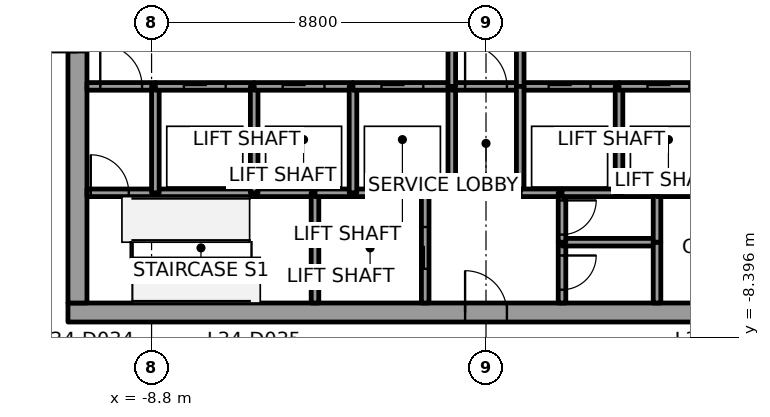
"""IFC4 building model, lengths in metres.
Left out: names, types, materials, properties, quantities, classifications, styles, units other than length and angle.
Written with IfcOpenShell. Run it as: python <this file> out.ifc"""

import sys

from ifc_helpers import new_model, si_unit, direction, frame, frame_2d, origin, place, context, subcontext, project, spatial, rectangle, extrude, element, fill, save


model = new_model("IFC4")
c1 = context("Model", 3, precision=1e-05, world=origin(), true_north=direction((0.0, 1.0)))
c2 = subcontext(c1, "Body", "Model", "MODEL_VIEW")
j1 = project(units=[si_unit("LENGTHUNIT", "METRE"), si_unit("PLANEANGLEUNIT", "RADIAN")], contexts=[c1])
p1 = place(None, origin())
s1 = spatial("IfcSite", under=j1, at=p1, CompositionType="ELEMENT")
p2 = place(p1, origin())
s2 = spatial("IfcBuilding", under=s1, at=p2, CompositionType="ELEMENT")
p3 = place(p2, frame((0.0, 0.0, 157.8)))
s3 = spatial("IfcBuildingStorey", under=s2, at=p3, CompositionType="ELEMENT", Elevation=157.8)
p4 = place(p3, frame((-11.0, -7.75, 0.0), z_axis=(0.0, 0.0, 1.0), x_axis=(1.0, 0.0, 0.0)))
e1 = element("IfcWall", 1, at=p4, inside=s3, PredefinedType="SHEAR", context=c2, shape_type="SweptSolid", body=[
    extrude(rectangle(XDim=22.0, YDim=0.5, at=frame_2d((11.0, 0.0))), origin(), (0.0, 0.0, 1.0), 4.0),
])
p5 = place(p4, frame((10.45, 0.0, 0.0)))
e2 = element("IfcOpeningElement", 2, at=p5, cuts=e1, PredefinedType="OPENING", context=c2, shape_type="SweptSolid", body=[
    extrude(rectangle(XDim=1.1, YDim=2.1, at=frame_2d((0.55, 1.05))), frame((0.0, 0.25, 0.0), z_axis=(0.0, -1.0, 0.0), x_axis=(1.0, 0.0, 0.0)), (0.0, 0.0, 1.0), 0.5),
])
p6 = place(p3, frame((-10.75, -7.5, 0.0), z_axis=(0.0, 0.0, 1.0), x_axis=(0.0, 1.0, 0.0)))
e3 = element("IfcWall", 3, at=p6, inside=s3, PredefinedType="SHEAR", context=c2, shape_type="SweptSolid", body=[
    extrude(rectangle(XDim=15.0, YDim=0.5, at=frame_2d((7.5, 0.0))), origin(), (0.0, 0.0, 1.0), 4.0),
])
p7 = place(p6, frame((6.6, 0.0, 0.0)))
e4 = element("IfcOpeningElement", 4, at=p7, cuts=e3, PredefinedType="OPENING", context=c2, shape_type="SweptSolid", body=[
    extrude(rectangle(XDim=1.8, YDim=2.1, at=frame_2d((0.9, 1.05))), frame((0.0, 0.25, 0.0), z_axis=(0.0, -1.0, 0.0), x_axis=(1.0, 0.0, 0.0)), (0.0, 0.0, 1.0), 0.5),
])
p8 = place(p3, frame((-10.5, -4.6, 0.0), z_axis=(0.0, 0.0, 1.0), x_axis=(1.0, 0.0, 0.0)))
e5 = element("IfcWall", 5, at=p8, inside=s3, PredefinedType="SOLIDWALL", context=c2, shape_type="SweptSolid", body=[
    extrude(rectangle(XDim=1.8, YDim=0.2, at=frame_2d((0.9, 0.0))), origin(), (0.0, 0.0, 1.0), 3.85),
])
p9 = place(p8, frame((0.1, 0.0, 0.0)))
e6 = element("IfcOpeningElement", 6, at=p9, cuts=e5, PredefinedType="OPENING", context=c2, shape_type="SweptSolid", body=[
    extrude(rectangle(XDim=1.0, YDim=2.1, at=frame_2d((0.5, 1.05))), frame((0.0, 0.1, 0.0), z_axis=(0.0, -1.0, 0.0), x_axis=(1.0, 0.0, 0.0)), (0.0, 0.0, 1.0), 0.2),
])
p10 = place(p3, frame((-10.5, -1.8, 0.0), z_axis=(0.0, 0.0, 1.0), x_axis=(1.0, 0.0, 0.0)))
e7 = element("IfcWall", 7, at=p10, inside=s3, PredefinedType="SOLIDWALL", context=c2, shape_type="SweptSolid", body=[
    extrude(rectangle(XDim=1.8, YDim=0.2, at=frame_2d((0.9, 0.0))), origin(), (0.0, 0.0, 1.0), 3.85),
])
p11 = place(p10, frame((0.35, 0.0, 0.0)))
e8 = element("IfcOpeningElement", 8, at=p11, cuts=e7, PredefinedType="OPENING", context=c2, shape_type="SweptSolid", body=[
    extrude(rectangle(XDim=1.1, YDim=2.1, at=frame_2d((0.55, 1.05))), frame((0.0, 0.1, 0.0), z_axis=(0.0, -1.0, 0.0), x_axis=(1.0, 0.0, 0.0)), (0.0, 0.0, 1.0), 0.2),
])
p12 = place(p3, frame((-8.7, -4.6, 0.0), z_axis=(0.0, 0.0, 1.0), x_axis=(1.0, 0.0, 0.0)))
e9 = element("IfcWall", 9, at=p12, inside=s3, PredefinedType="SOLIDWALL", context=c2, shape_type="SweptSolid", body=[
    extrude(rectangle(XDim=2.6, YDim=0.2, at=frame_2d((1.3, 0.0))), origin(), (0.0, 0.0, 1.0), 3.85),
])
p13 = place(p3, frame((-8.7, -4.6, 0.0), z_axis=(0.0, 0.0, 1.0), x_axis=(0.0, 1.0, 0.0)))
e10 = element("IfcWall", 10, at=p13, inside=s3, PredefinedType="SOLIDWALL", context=c2, shape_type="SweptSolid", body=[
    extrude(rectangle(XDim=2.8, YDim=0.2, at=frame_2d((1.4, 0.0))), origin(), (0.0, 0.0, 1.0), 3.85),
])
p14 = place(p3, frame((-8.7, -1.8, 0.0), z_axis=(0.0, 0.0, 1.0), x_axis=(1.0, 0.0, 0.0)))
e11 = element("IfcWall", 11, at=p14, inside=s3, PredefinedType="SOLIDWALL", context=c2, shape_type="SweptSolid", body=[
    extrude(rectangle(XDim=2.6, YDim=0.2, at=frame_2d((1.3, 0.0))), origin(), (0.0, 0.0, 1.0), 3.85),
])
p15 = place(p14, frame((0.75, 0.0, 0.0)))
e12 = element("IfcOpeningElement", 12, at=p15, cuts=e11, PredefinedType="OPENING", context=c2, shape_type="SweptSolid", body=[
    extrude(rectangle(XDim=1.1, YDim=2.1, at=frame_2d((0.55, 1.05))), frame((0.0, 0.1, 0.0), z_axis=(0.0, -1.0, 0.0), x_axis=(1.0, 0.0, 0.0)), (0.0, 0.0, 1.0), 0.2),
])
p16 = place(p3, frame((-6.1, -4.6, 0.0), z_axis=(0.0, 0.0, 1.0), x_axis=(1.0, 0.0, 0.0)))
e13 = element("IfcWall", 13, at=p16, inside=s3, PredefinedType="SOLIDWALL", context=c2, shape_type="SweptSolid", body=[
    extrude(rectangle(XDim=1.6, YDim=0.2, at=frame_2d((0.8, 0.0))), origin(), (0.0, 0.0, 1.0), 3.85),
])
p17 = place(p3, frame((-6.1, -4.6, 0.0), z_axis=(0.0, 0.0, 1.0), x_axis=(0.0, 1.0, 0.0)))
e14 = element("IfcWall", 14, at=p17, inside=s3, PredefinedType="SOLIDWALL", context=c2, shape_type="SweptSolid", body=[
    extrude(rectangle(XDim=2.8, YDim=0.2, at=frame_2d((1.4, 0.0))), origin(), (0.0, 0.0, 1.0), 3.85),
])
p18 = place(p3, frame((-6.1, -1.8, 0.0), z_axis=(0.0, 0.0, 1.0), x_axis=(1.0, 0.0, 0.0)))
e15 = element("IfcWall", 15, at=p18, inside=s3, PredefinedType="SOLIDWALL", context=c2, shape_type="SweptSolid", body=[
    extrude(rectangle(XDim=2.6, YDim=0.2, at=frame_2d((1.3, 0.0))), origin(), (0.0, 0.0, 1.0), 3.85),
])
p19 = place(p18, frame((0.75, 0.0, 0.0)))
e16 = element("IfcOpeningElement", 16, at=p19, cuts=e15, PredefinedType="OPENING", context=c2, shape_type="SweptSolid", body=[
    extrude(rectangle(XDim=1.1, YDim=2.1, at=frame_2d((0.55, 1.05))), frame((0.0, 0.1, 0.0), z_axis=(0.0, -1.0, 0.0), x_axis=(1.0, 0.0, 0.0)), (0.0, 0.0, 1.0), 0.2),
])
p20 = place(p3, frame((-4.5, -4.6, 0.0), z_axis=(0.0, 0.0, 1.0), x_axis=(0.0, -1.0, 0.0)))
e17 = element("IfcWall", 17, at=p20, inside=s3, PredefinedType="SOLIDWALL", context=c2, shape_type="SweptSolid", body=[
    extrude(rectangle(XDim=2.9, YDim=0.2, at=frame_2d((1.45, 0.0))), origin(), (0.0, 0.0, 1.0), 3.85),
])
p21 = place(p3, frame((-4.5, -4.6, 0.0), z_axis=(0.0, 0.0, 1.0), x_axis=(1.0, 0.0, 0.0)))
e18 = element("IfcWall", 18, at=p21, inside=s3, PredefinedType="SOLIDWALL", context=c2, shape_type="SweptSolid", body=[
    extrude(rectangle(XDim=1.0, YDim=0.2, at=frame_2d((0.5, 0.0))), origin(), (0.0, 0.0, 1.0), 3.85),
])
p22 = place(p3, frame((-3.5, -4.6, 0.0), z_axis=(0.0, 0.0, 1.0), x_axis=(1.0, 0.0, 0.0)))
e19 = element("IfcWall", 19, at=p22, inside=s3, PredefinedType="SOLIDWALL", context=c2, shape_type="SweptSolid", body=[
    extrude(rectangle(XDim=1.9, YDim=0.2, at=frame_2d((0.95, 0.0))), origin(), (0.0, 0.0, 1.0), 3.85),
])
p23 = place(p3, frame((-3.5, -4.6, 0.0), z_axis=(0.0, 0.0, 1.0), x_axis=(0.0, 1.0, 0.0)))
e20 = element("IfcWall", 20, at=p23, inside=s3, PredefinedType="SOLIDWALL", context=c2, shape_type="SweptSolid", body=[
    extrude(rectangle(XDim=2.8, YDim=0.2, at=frame_2d((1.4, 0.0))), origin(), (0.0, 0.0, 1.0), 3.85),
])
p24 = place(p3, frame((-3.5, -1.8, 0.0), z_axis=(0.0, 0.0, 1.0), x_axis=(1.0, 0.0, 0.0)))
e21 = element("IfcWall", 21, at=p24, inside=s3, PredefinedType="SOLIDWALL", context=c2, shape_type="SweptSolid", body=[
    extrude(rectangle(XDim=2.6, YDim=0.2, at=frame_2d((1.3, 0.0))), origin(), (0.0, 0.0, 1.0), 3.85),
])
p25 = place(p24, frame((0.75, 0.0, 0.0)))
e22 = element("IfcOpeningElement", 22, at=p25, cuts=e21, PredefinedType="OPENING", context=c2, shape_type="SweptSolid", body=[
    extrude(rectangle(XDim=1.1, YDim=2.1, at=frame_2d((0.55, 1.05))), frame((0.0, 0.1, 0.0), z_axis=(0.0, -1.0, 0.0), x_axis=(1.0, 0.0, 0.0)), (0.0, 0.0, 1.0), 0.2),
])
p26 = place(p3, frame((-1.6, -7.5, 0.0), z_axis=(0.0, 0.0, 1.0), x_axis=(0.0, 1.0, 0.0)))
e23 = element("IfcWall", 23, at=p26, inside=s3, PredefinedType="SOLIDWALL", context=c2, shape_type="SweptSolid", body=[
    extrude(rectangle(XDim=2.9, YDim=0.2, at=frame_2d((1.45, 0.0))), origin(), (0.0, 0.0, 1.0), 3.85),
])
p27 = place(p26, frame((0.9, 0.0, 0.0)))
e24 = element("IfcOpeningElement", 24, at=p27, cuts=e23, PredefinedType="OPENING", context=c2, shape_type="SweptSolid", body=[
    extrude(rectangle(XDim=1.1, YDim=2.1, at=frame_2d((0.55, 1.05))), frame((0.0, 0.1, 0.0), z_axis=(0.0, -1.0, 0.0), x_axis=(1.0, 0.0, 0.0)), (0.0, 0.0, 1.0), 0.2),
])
p28 = place(p3, frame((-1.6, -4.6, 0.0), z_axis=(0.0, 0.0, 1.0), x_axis=(1.0, 0.0, 0.0)))
e25 = element("IfcWall", 25, at=p28, inside=s3, PredefinedType="SOLIDWALL", context=c2, shape_type="SweptSolid", body=[
    extrude(rectangle(XDim=0.7, YDim=0.2, at=frame_2d((0.35, 0.0))), origin(), (0.0, 0.0, 1.0), 3.85),
])
p29 = place(p3, frame((-0.9, -4.6, 0.0), z_axis=(0.0, 0.0, 1.0), x_axis=(0.0, 1.0, 0.0)))
e26 = element("IfcWall", 26, at=p29, inside=s3, PredefinedType="SOLIDWALL", context=c2, shape_type="SweptSolid", body=[
    extrude(rectangle(XDim=2.8, YDim=0.2, at=frame_2d((1.4, 0.0))), origin(), (0.0, 0.0, 1.0), 3.85),
])
p30 = place(p3, frame((-0.9, -1.8, 0.0), z_axis=(0.0, 0.0, 1.0), x_axis=(1.0, 0.0, 0.0)))
e27 = element("IfcWall", 27, at=p30, inside=s3, PredefinedType="SOLIDWALL", context=c2, shape_type="SweptSolid", body=[
    extrude(rectangle(XDim=1.8, YDim=0.2, at=frame_2d((0.9, 0.0))), origin(), (0.0, 0.0, 1.0), 3.85),
])
p31 = place(p30, frame((0.35, 0.0, 0.0)))
e28 = element("IfcOpeningElement", 28, at=p31, cuts=e27, PredefinedType="OPENING", context=c2, shape_type="SweptSolid", body=[
    extrude(rectangle(XDim=1.1, YDim=2.1, at=frame_2d((0.55, 1.05))), frame((0.0, 0.1, 0.0), z_axis=(0.0, -1.0, 0.0), x_axis=(1.0, 0.0, 0.0)), (0.0, 0.0, 1.0), 0.2),
])
p32 = place(p3, frame((-0.9, 1.8, 0.0), z_axis=(0.0, 0.0, 1.0), x_axis=(0.0, -1.0, 0.0)))
e29 = element("IfcWall", 29, at=p32, inside=s3, PredefinedType="SOLIDWALL", context=c2, shape_type="SweptSolid", body=[
    extrude(rectangle(XDim=3.6, YDim=0.2, at=frame_2d((1.8, 0.0))), origin(), (0.0, 0.0, 1.0), 3.85),
])
p33 = place(p32, frame((1.05, 0.0, 0.0)))
e30 = element("IfcOpeningElement", 30, at=p33, cuts=e29, PredefinedType="OPENING", context=c2, shape_type="SweptSolid", body=[
    extrude(rectangle(XDim=1.5, YDim=2.1, at=frame_2d((0.75, 1.05))), frame((0.0, 0.1, 0.0), z_axis=(0.0, -1.0, 0.0), x_axis=(1.0, 0.0, 0.0)), (0.0, 0.0, 1.0), 0.2),
])
p34 = place(p3, frame((0.9, -1.8, 0.0), z_axis=(0.0, 0.0, 1.0), x_axis=(1.0, 0.0, 0.0)))
e31 = element("IfcWall", 31, at=p34, inside=s3, PredefinedType="SOLIDWALL", context=c2, shape_type="SweptSolid", body=[
    extrude(rectangle(XDim=2.6, YDim=0.2, at=frame_2d((1.3, 0.0))), origin(), (0.0, 0.0, 1.0), 3.85),
])
p35 = place(p34, frame((0.75, 0.0, 0.0)))
e32 = element("IfcOpeningElement", 32, at=p35, cuts=e31, PredefinedType="OPENING", context=c2, shape_type="SweptSolid", body=[
    extrude(rectangle(XDim=1.1, YDim=2.1, at=frame_2d((0.55, 1.05))), frame((0.0, 0.1, 0.0), z_axis=(0.0, -1.0, 0.0), x_axis=(1.0, 0.0, 0.0)), (0.0, 0.0, 1.0), 0.2),
])
p36 = place(p3, frame((0.9, -1.8, 0.0), z_axis=(0.0, 0.0, 1.0), x_axis=(0.0, 1.0, 0.0)))
e33 = element("IfcWall", 33, at=p36, inside=s3, PredefinedType="SOLIDWALL", context=c2, shape_type="SweptSolid", body=[
    extrude(rectangle(XDim=3.6, YDim=0.2, at=frame_2d((1.8, 0.0))), origin(), (0.0, 0.0, 1.0), 3.85),
])
p37 = place(p36, frame((1.05, 0.0, 0.0)))
e34 = element("IfcOpeningElement", 34, at=p37, cuts=e33, PredefinedType="OPENING", context=c2, shape_type="SweptSolid", body=[
    extrude(rectangle(XDim=1.5, YDim=2.1, at=frame_2d((0.75, 1.05))), frame((0.0, 0.1, 0.0), z_axis=(0.0, -1.0, 0.0), x_axis=(1.0, 0.0, 0.0)), (0.0, 0.0, 1.0), 0.2),
])
p38 = place(p3, frame((0.9, -1.8, 0.0), z_axis=(0.0, 0.0, 1.0), x_axis=(0.0, -1.0, 0.0)))
e35 = element("IfcWall", 35, at=p38, inside=s3, PredefinedType="SOLIDWALL", context=c2, shape_type="SweptSolid", body=[
    extrude(rectangle(XDim=2.8, YDim=0.2, at=frame_2d((1.4, 0.0))), origin(), (0.0, 0.0, 1.0), 3.85),
])
p39 = place(p3, frame((0.9, -4.6, 0.0), z_axis=(0.0, 0.0, 1.0), x_axis=(1.0, 0.0, 0.0)))
e36 = element("IfcWall", 36, at=p39, inside=s3, PredefinedType="SOLIDWALL", context=c2, shape_type="SweptSolid", body=[
    extrude(rectangle(XDim=1.1, YDim=0.2, at=frame_2d((0.55, 0.0))), origin(), (0.0, 0.0, 1.0), 3.85),
])
p40 = place(p3, frame((2.0, -5.9, 0.0), z_axis=(0.0, 0.0, 1.0), x_axis=(0.0, -1.0, 0.0)))
e37 = element("IfcWall", 37, at=p40, inside=s3, PredefinedType="SOLIDWALL", context=c2, shape_type="SweptSolid", body=[
    extrude(rectangle(XDim=1.6, YDim=0.2, at=frame_2d((0.8, 0.0))), origin(), (0.0, 0.0, 1.0), 3.85),
])
p41 = place(p40, frame((0.35, 0.0, 0.0)))
e38 = element("IfcOpeningElement", 38, at=p41, cuts=e37, PredefinedType="OPENING", context=c2, shape_type="SweptSolid", body=[
    extrude(rectangle(XDim=0.9, YDim=2.1, at=frame_2d((0.45, 1.05))), frame((0.0, 0.1, 0.0), z_axis=(0.0, -1.0, 0.0), x_axis=(1.0, 0.0, 0.0)), (0.0, 0.0, 1.0), 0.2),
])
p42 = place(p3, frame((4.5, -5.9, 0.0), z_axis=(0.0, 0.0, 1.0), x_axis=(-1.0, 0.0, 0.0)))
e39 = element("IfcWall", 39, at=p42, inside=s3, PredefinedType="SOLIDWALL", context=c2, shape_type="SweptSolid", body=[
    extrude(rectangle(XDim=2.5, YDim=0.2, at=frame_2d((1.25, 0.0))), origin(), (0.0, 0.0, 1.0), 3.85),
])
p43 = place(p3, frame((2.0, -4.6, 0.0), z_axis=(0.0, 0.0, 1.0), x_axis=(0.0, -1.0, 0.0)))
e40 = element("IfcWall", 40, at=p43, inside=s3, PredefinedType="SOLIDWALL", context=c2, shape_type="SweptSolid", body=[
    extrude(rectangle(XDim=1.3, YDim=0.2, at=frame_2d((0.65, 0.0))), origin(), (0.0, 0.0, 1.0), 3.85),
])
p44 = place(p43, frame((0.2, 0.0, 0.0)))
e41 = element("IfcOpeningElement", 41, at=p44, cuts=e40, PredefinedType="OPENING", context=c2, shape_type="SweptSolid", body=[
    extrude(rectangle(XDim=0.9, YDim=2.1, at=frame_2d((0.45, 1.05))), frame((0.0, 0.1, 0.0), z_axis=(0.0, -1.0, 0.0), x_axis=(1.0, 0.0, 0.0)), (0.0, 0.0, 1.0), 0.2),
])
p45 = place(p3, frame((3.5, -4.6, 0.0), z_axis=(0.0, 0.0, 1.0), x_axis=(-1.0, 0.0, 0.0)))
e42 = element("IfcWall", 42, at=p45, inside=s3, PredefinedType="SOLIDWALL", context=c2, shape_type="SweptSolid", body=[
    extrude(rectangle(XDim=1.5, YDim=0.2, at=frame_2d((0.75, 0.0))), origin(), (0.0, 0.0, 1.0), 3.85),
])
p46 = place(p3, frame((4.5, -4.6, 0.0), z_axis=(0.0, 0.0, 1.0), x_axis=(-1.0, 0.0, 0.0)))
e43 = element("IfcWall", 43, at=p46, inside=s3, PredefinedType="SOLIDWALL", context=c2, shape_type="SweptSolid", body=[
    extrude(rectangle(XDim=1.0, YDim=0.2, at=frame_2d((0.5, 0.0))), origin(), (0.0, 0.0, 1.0), 3.85),
])
p47 = place(p3, frame((3.5, -4.6, 0.0), z_axis=(0.0, 0.0, 1.0), x_axis=(0.0, 1.0, 0.0)))
e44 = element("IfcWall", 44, at=p47, inside=s3, PredefinedType="SOLIDWALL", context=c2, shape_type="SweptSolid", body=[
    extrude(rectangle(XDim=2.8, YDim=0.2, at=frame_2d((1.4, 0.0))), origin(), (0.0, 0.0, 1.0), 3.85),
])
p48 = place(p3, frame((3.5, -1.8, 0.0), z_axis=(0.0, 0.0, 1.0), x_axis=(1.0, 0.0, 0.0)))
e45 = element("IfcWall", 45, at=p48, inside=s3, PredefinedType="SOLIDWALL", context=c2, shape_type="SweptSolid", body=[
    extrude(rectangle(XDim=2.6, YDim=0.2, at=frame_2d((1.3, 0.0))), origin(), (0.0, 0.0, 1.0), 3.85),
])
p49 = place(p48, frame((0.75, 0.0, 0.0)))
e46 = element("IfcOpeningElement", 46, at=p49, cuts=e45, PredefinedType="OPENING", context=c2, shape_type="SweptSolid", body=[
    extrude(rectangle(XDim=1.1, YDim=2.1, at=frame_2d((0.55, 1.05))), frame((0.0, 0.1, 0.0), z_axis=(0.0, -1.0, 0.0), x_axis=(1.0, 0.0, 0.0)), (0.0, 0.0, 1.0), 0.2),
])
p50 = place(p3, frame((4.5, -5.9, 0.0), z_axis=(0.0, 0.0, 1.0), x_axis=(0.0, -1.0, 0.0)))
e47 = element("IfcWall", 47, at=p50, inside=s3, PredefinedType="SOLIDWALL", context=c2, shape_type="SweptSolid", body=[
    extrude(rectangle(XDim=1.6, YDim=0.2, at=frame_2d((0.8, 0.0))), origin(), (0.0, 0.0, 1.0), 3.85),
])
p51 = place(p3, frame((4.5, -4.6, 0.0), z_axis=(0.0, 0.0, 1.0), x_axis=(0.0, -1.0, 0.0)))
e48 = element("IfcWall", 48, at=p51, inside=s3, PredefinedType="SOLIDWALL", context=c2, shape_type="SweptSolid", body=[
    extrude(rectangle(XDim=1.3, YDim=0.2, at=frame_2d((0.65, 0.0))), origin(), (0.0, 0.0, 1.0), 3.85),
])
p52 = place(p3, frame((6.1, -4.6, 0.0), z_axis=(0.0, 0.0, 1.0), x_axis=(-1.0, 0.0, 0.0)))
e49 = element("IfcWall", 49, at=p52, inside=s3, PredefinedType="SOLIDWALL", context=c2, shape_type="SweptSolid", body=[
    extrude(rectangle(XDim=1.6, YDim=0.2, at=frame_2d((0.8, 0.0))), origin(), (0.0, 0.0, 1.0), 3.85),
])
p53 = place(p15, origin())
e50 = element("IfcDoor", 50, at=p53, inside=s3, OperationType="SLIDING_TO_LEFT", PredefinedType="DOOR", context=c2, shape_type="SweptSolid", body=[
    extrude(rectangle(XDim=1.1, YDim=2.1, at=frame_2d((0.55, 1.05))), frame((0.0, 0.025, 0.0), z_axis=(0.0, -1.0, 0.0), x_axis=(1.0, 0.0, 0.0)), (0.0, 0.0, 1.0), 0.05),
])
fill(e12, e50)
p54 = place(p19, origin())
e51 = element("IfcDoor", 51, at=p54, inside=s3, OperationType="SLIDING_TO_LEFT", PredefinedType="DOOR", context=c2, shape_type="SweptSolid", body=[
    extrude(rectangle(XDim=1.1, YDim=2.1, at=frame_2d((0.55, 1.05))), frame((0.0, 0.025, 0.0), z_axis=(0.0, -1.0, 0.0), x_axis=(1.0, 0.0, 0.0)), (0.0, 0.0, 1.0), 0.05),
])
fill(e16, e51)
p55 = place(p25, origin())
e52 = element("IfcDoor", 52, at=p55, inside=s3, OperationType="SLIDING_TO_RIGHT", PredefinedType="DOOR", context=c2, shape_type="SweptSolid", body=[
    extrude(rectangle(XDim=1.1, YDim=2.1, at=frame_2d((0.55, 1.05))), frame((0.0, 0.025, 0.0), z_axis=(0.0, -1.0, 0.0), x_axis=(1.0, 0.0, 0.0)), (0.0, 0.0, 1.0), 0.05),
])
fill(e22, e52)
p56 = place(p35, origin())
e53 = element("IfcDoor", 53, at=p56, inside=s3, OperationType="SLIDING_TO_RIGHT", PredefinedType="DOOR", context=c2, shape_type="SweptSolid", body=[
    extrude(rectangle(XDim=1.1, YDim=2.1, at=frame_2d((0.55, 1.05))), frame((0.0, 0.025, 0.0), z_axis=(0.0, -1.0, 0.0), x_axis=(1.0, 0.0, 0.0)), (0.0, 0.0, 1.0), 0.05),
])
fill(e32, e53)
p57 = place(p49, origin())
e54 = element("IfcDoor", 54, at=p57, inside=s3, OperationType="SLIDING_TO_LEFT", PredefinedType="DOOR", context=c2, shape_type="SweptSolid", body=[
    extrude(rectangle(XDim=1.1, YDim=2.1, at=frame_2d((0.55, 1.05))), frame((0.0, 0.025, 0.0), z_axis=(0.0, -1.0, 0.0), x_axis=(1.0, 0.0, 0.0)), (0.0, 0.0, 1.0), 0.05),
])
fill(e46, e54)
p58 = place(p27, origin())
e55 = element("IfcDoor", 55, at=p58, inside=s3, OperationType="SLIDING_TO_RIGHT", PredefinedType="DOOR", context=c2, shape_type="SweptSolid", body=[
    extrude(rectangle(XDim=1.1, YDim=2.1, at=frame_2d((0.55, 1.05))), frame((0.0, 0.025, 0.0), z_axis=(0.0, -1.0, 0.0), x_axis=(1.0, 0.0, 0.0)), (0.0, 0.0, 1.0), 0.05),
])
fill(e24, e55)
p59 = place(p11, origin())
e56 = element("IfcDoor", 56, at=p59, inside=s3, OperationType="SINGLE_SWING_LEFT", PredefinedType="DOOR", context=c2, shape_type="SweptSolid", body=[
    extrude(rectangle(XDim=1.1, YDim=2.1, at=frame_2d((0.55, 1.05))), frame((0.0, 0.025, 0.0), z_axis=(0.0, -1.0, 0.0), x_axis=(1.0, 0.0, 0.0)), (0.0, 0.0, 1.0), 0.05),
])
fill(e8, e56)
p60 = place(p31, origin())
e57 = element("IfcDoor", 57, at=p60, inside=s3, OperationType="SINGLE_SWING_RIGHT", PredefinedType="DOOR", context=c2, shape_type="SweptSolid", body=[
    extrude(rectangle(XDim=1.1, YDim=2.1, at=frame_2d((0.55, 1.05))), frame((0.0, 0.025, 0.0), z_axis=(0.0, -1.0, 0.0), x_axis=(1.0, 0.0, 0.0)), (0.0, 0.0, 1.0), 0.05),
])
fill(e28, e57)
p61 = place(p9, origin())
e58 = element("IfcDoor", 58, at=p61, inside=s3, OperationType="SINGLE_SWING_LEFT", PredefinedType="DOOR", context=c2, shape_type="SweptSolid", body=[
    extrude(rectangle(XDim=1.0, YDim=2.1, at=frame_2d((0.5, 1.05))), frame((0.0, 0.025, 0.0), z_axis=(0.0, -1.0, 0.0), x_axis=(1.0, 0.0, 0.0)), (0.0, 0.0, 1.0), 0.05),
])
fill(e6, e58)
p62 = place(p41, origin())
e59 = element("IfcDoor", 59, at=p62, inside=s3, OperationType="SINGLE_SWING_LEFT", PredefinedType="DOOR", context=c2, shape_type="SweptSolid", body=[
    extrude(rectangle(XDim=0.9, YDim=2.1, at=frame_2d((0.45, 1.05))), frame((0.0, 0.025, 0.0), z_axis=(0.0, -1.0, 0.0), x_axis=(1.0, 0.0, 0.0)), (0.0, 0.0, 1.0), 0.05),
])
fill(e38, e59)
p63 = place(p44, origin())
e60 = element("IfcDoor", 60, at=p63, inside=s3, OperationType="SINGLE_SWING_RIGHT", PredefinedType="DOOR", context=c2, shape_type="SweptSolid", body=[
    extrude(rectangle(XDim=0.9, YDim=2.1, at=frame_2d((0.45, 1.05))), frame((0.0, 0.025, 0.0), z_axis=(0.0, -1.0, 0.0), x_axis=(1.0, 0.0, 0.0)), (0.0, 0.0, 1.0), 0.05),
])
fill(e41, e60)
p64 = place(p7, origin())
e61 = element("IfcDoor", 61, at=p64, inside=s3, OperationType="DOUBLE_DOOR_SINGLE_SWING", PredefinedType="DOOR", context=c2, shape_type="SweptSolid", body=[
    extrude(rectangle(XDim=1.8, YDim=2.1, at=frame_2d((0.9, 1.05))), frame((0.0, 0.025, 0.0), z_axis=(0.0, -1.0, 0.0), x_axis=(1.0, 0.0, 0.0)), (0.0, 0.0, 1.0), 0.05),
])
fill(e4, e61)
p65 = place(p5, origin())
e62 = element("IfcDoor", 62, at=p65, inside=s3, OperationType="SINGLE_SWING_RIGHT", PredefinedType="DOOR", context=c2, shape_type="SweptSolid", body=[
    extrude(rectangle(XDim=1.1, YDim=2.1, at=frame_2d((0.55, 1.05))), frame((0.0, 0.025, 0.0), z_axis=(0.0, -1.0, 0.0), x_axis=(1.0, 0.0, 0.0)), (0.0, 0.0, 1.0), 0.05),
])
fill(e2, e62)
save(model, sys.argv[1])
